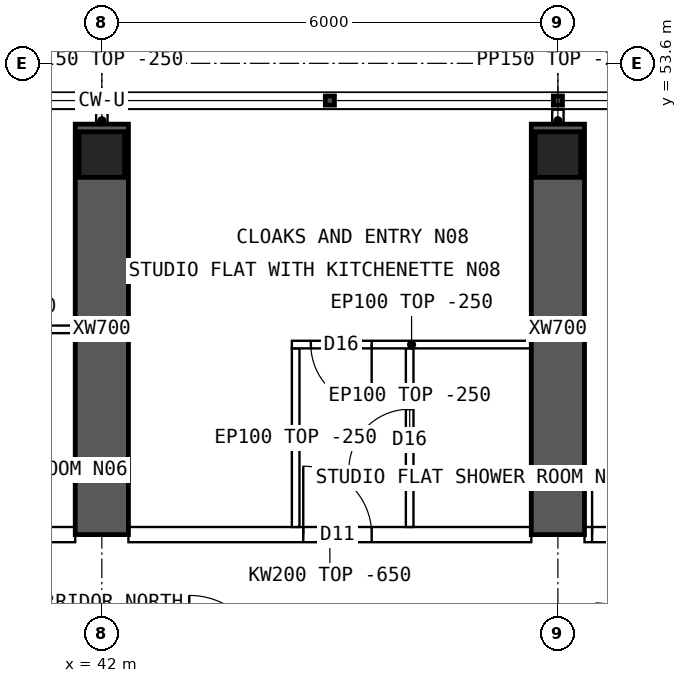
"""IFC4 building model, lengths in metres.
Left out: names, types, materials, properties, quantities, classifications, styles, units other than length and angle.
Written with IfcOpenShell. Run it as: python <this file> out.ifc"""

import sys

from ifc_helpers import new_model, si_unit, direction, frame, frame_2d, origin, origin_2d, place, context, subcontext, project, spatial, polyline, rectangle, hollow_rectangle, outline, extrude, element, fill, save


model = new_model("IFC4")
c1 = context("Model", 3, precision=1e-05, world=origin(), true_north=direction((0.0, 1.0)))
c2 = subcontext(c1, "Body", "Model", "MODEL_VIEW")
j1 = project(units=[si_unit("LENGTHUNIT", "METRE"), si_unit("PLANEANGLEUNIT", "RADIAN")], contexts=[c1])
p1 = place(None, origin())
s1 = spatial("IfcSite", under=j1, at=p1, CompositionType="ELEMENT")
p2 = place(p1, origin())
s2 = spatial("IfcBuilding", under=s1, at=p2, CompositionType="ELEMENT")
p3 = place(p2, frame((0.0, 0.0, 216.55)))
s3 = spatial("IfcBuildingStorey", under=s2, at=p3, CompositionType="ELEMENT", Elevation=216.55)
for number, where, z_axis, x_axis in (
    (1, (42.0, 52.4, 0.0), (0.0, 0.0, 1.0), (1.0, 0.0, 0.0)),
    (2, (48.0, 52.4, 0.0), (0.0, 0.0, 1.0), (1.0, 0.0, 0.0)),
):
    element("IfcColumn", number, at=place(p3, frame(where, z_axis=z_axis, x_axis=x_axis)), inside=s3, PredefinedType="COLUMN", context=c2, shape_type="SweptSolid", body=[
        extrude(hollow_rectangle(XDim=0.6, YDim=0.6, WallThickness=0.06, at=origin_2d()), origin(), (0.0, 0.0, 1.0), 3.75),
    ])
for number, where, z_axis, x_axis in (
    (3, (42.0, 47.4, 0.0), (0.0, 0.0, 1.0), (0.0, 1.0, 0.0)),
    (4, (48.0, 47.4, 0.0), (0.0, 0.0, 1.0), (0.0, 1.0, 0.0)),
):
    element("IfcWall", number, at=place(p3, frame(where, z_axis=z_axis, x_axis=x_axis)), inside=s3, PredefinedType="SHEAR", context=c2, shape_type="SweptSolid", body=[
        extrude(rectangle(XDim=5.4, YDim=0.7, at=frame_2d((2.7, 0.0))), origin(), (0.0, 0.0, 1.0), 3.75),
    ])
p4 = place(p3, frame((36.35, 47.4, 0.0), z_axis=(0.0, 0.0, 1.0), x_axis=(1.0, 0.0, 0.0)))
e5 = element("IfcWall", 5, at=p4, inside=s3, PredefinedType="SOLIDWALL", context=c2, shape_type="SweptSolid", body=[
    extrude(outline(polyline([(0.0, 0.0), (5.3, 0.0), (5.3, 3.1), (0.0, 3.1), (0.0, 0.0)])), frame((0.0, 0.1, 0.0), z_axis=(0.0, -1.0, 0.0), x_axis=(1.0, 0.0, 0.0)), (0.0, 0.0, 1.0), 0.2),
])
p5 = place(p4, frame((0.3, 0.0, 0.0)))
e6 = element("IfcOpeningElement", 6, at=p5, cuts=e5, PredefinedType="OPENING", context=c2, shape_type="SweptSolid", body=[
    extrude(rectangle(XDim=1.0, YDim=2.1, at=frame_2d((0.5, 1.05))), frame((0.0, 0.11, 0.0), z_axis=(0.0, -1.0, 0.0), x_axis=(1.0, 0.0, 0.0)), (0.0, 0.0, 1.0), 0.22),
])
p6 = place(p3, frame((42.35, 47.4, 0.0), z_axis=(0.0, 0.0, 1.0), x_axis=(1.0, 0.0, 0.0)))
e7 = element("IfcWall", 7, at=p6, inside=s3, PredefinedType="SOLIDWALL", context=c2, shape_type="SweptSolid", body=[
    extrude(outline(polyline([(0.0, 0.0), (5.3, 0.0), (5.3, 3.1), (0.0, 3.1), (0.0, 0.0)])), frame((0.0, 0.1, 0.0), z_axis=(0.0, -1.0, 0.0), x_axis=(1.0, 0.0, 0.0)), (0.0, 0.0, 1.0), 0.2),
])
p7 = place(p6, frame((2.3, 0.0, 0.0)))
e8 = element("IfcOpeningElement", 8, at=p7, cuts=e7, PredefinedType="OPENING", context=c2, shape_type="SweptSolid", body=[
    extrude(rectangle(XDim=0.9, YDim=2.1, at=frame_2d((0.45, 1.05))), frame((0.0, 0.11, 0.0), z_axis=(0.0, -1.0, 0.0), x_axis=(1.0, 0.0, 0.0)), (0.0, 0.0, 1.0), 0.22),
])
p8 = place(p3, frame((48.35, 47.4, 0.0), z_axis=(0.0, 0.0, 1.0), x_axis=(1.0, 0.0, 0.0)))
e9 = element("IfcWall", 9, at=p8, inside=s3, PredefinedType="SOLIDWALL", context=c2, shape_type="SweptSolid", body=[
    extrude(outline(polyline([(0.0, 0.0), (5.3, 0.0), (5.3, 3.1), (0.0, 3.1), (0.0, 0.0)])), frame((0.0, 0.1, 0.0), z_axis=(0.0, -1.0, 0.0), x_axis=(1.0, 0.0, 0.0)), (0.0, 0.0, 1.0), 0.2),
])
p9 = place(p8, frame((0.1, 0.0, 0.0)))
e10 = element("IfcOpeningElement", 10, at=p9, cuts=e9, PredefinedType="OPENING", context=c2, shape_type="SweptSolid", body=[
    extrude(rectangle(XDim=0.9, YDim=2.1, at=frame_2d((0.45, 1.05))), frame((0.0, 0.11, 0.0), z_axis=(0.0, -1.0, 0.0), x_axis=(1.0, 0.0, 0.0)), (0.0, 0.0, 1.0), 0.22),
])
p10 = place(p3, frame((39.0, 50.1, 0.0), z_axis=(0.0, 0.0, 1.0), x_axis=(1.0, 0.0, 0.0)))
e11 = element("IfcWall", 11, at=p10, inside=s3, PredefinedType="PARTITIONING", context=c2, shape_type="SweptSolid", body=[
    extrude(rectangle(XDim=2.65, YDim=0.1, at=frame_2d((1.325, 0.0))), origin(), (0.0, 0.0, 1.0), 3.5),
])
p11 = place(p3, frame((44.5, 49.9, 0.0), z_axis=(0.0, 0.0, 1.0), x_axis=(1.0, 0.0, 0.0)))
e12 = element("IfcWall", 12, at=p11, inside=s3, PredefinedType="PARTITIONING", context=c2, shape_type="SweptSolid", body=[
    extrude(rectangle(XDim=3.15, YDim=0.1, at=frame_2d((1.575, 0.0))), origin(), (0.0, 0.0, 1.0), 3.5),
])
p12 = place(p11, frame((0.25, 0.0, 0.0)))
e13 = element("IfcOpeningElement", 13, at=p12, cuts=e12, PredefinedType="OPENING", context=c2, shape_type="SweptSolid", body=[
    extrude(rectangle(XDim=0.8, YDim=2.1, at=frame_2d((0.4, 1.05))), frame((0.0, 0.06, 0.0), z_axis=(0.0, -1.0, 0.0), x_axis=(1.0, 0.0, 0.0)), (0.0, 0.0, 1.0), 0.12),
])
p13 = place(p3, frame((44.55, 49.85, 0.0), z_axis=(0.0, 0.0, 1.0), x_axis=(0.0, -1.0, 0.0)))
e14 = element("IfcWall", 14, at=p13, inside=s3, PredefinedType="PARTITIONING", context=c2, shape_type="SweptSolid", body=[
    extrude(outline(polyline([(0.0, 0.0), (2.35, 0.0), (2.35, 3.1), (2.302, 3.1), (2.3, 3.5), (0.0, 3.5), (0.0, 0.0)])), frame((0.0, 0.05, 0.0), z_axis=(0.0, -1.0, 0.0), x_axis=(1.0, 0.0, 0.0)), (0.0, 0.0, 1.0), 0.1),
])
p14 = place(p3, frame((46.05, 49.85, 0.0), z_axis=(0.0, 0.0, 1.0), x_axis=(0.0, -1.0, 0.0)))
e15 = element("IfcWall", 15, at=p14, inside=s3, PredefinedType="PARTITIONING", context=c2, shape_type="SweptSolid", body=[
    extrude(outline(polyline([(0.0, 0.0), (2.35, 0.0), (2.35, 3.1), (2.302, 3.1), (2.3, 3.5), (0.0, 3.5), (0.0, 0.0)])), frame((0.0, 0.05, 0.0), z_axis=(0.0, -1.0, 0.0), x_axis=(1.0, 0.0, 0.0)), (0.0, 0.0, 1.0), 0.1),
])
p15 = place(p14, frame((0.8, 0.0, 0.0)))
e16 = element("IfcOpeningElement", 16, at=p15, cuts=e15, PredefinedType="OPENING", context=c2, shape_type="SweptSolid", body=[
    extrude(rectangle(XDim=0.8, YDim=2.1, at=frame_2d((0.4, 1.05))), frame((0.0, 0.06, 0.0), z_axis=(0.0, -1.0, 0.0), x_axis=(1.0, 0.0, 0.0)), (0.0, 0.0, 1.0), 0.12),
])
for number, where, z_axis, x_axis in (
    (17, (42.0, 52.7, 0.0), (0.0, 0.0, 1.0), (0.0, 1.0, 0.0)),
    (18, (48.0, 52.7, 0.0), (0.0, 0.0, 1.0), (0.0, 1.0, 0.0)),
):
    element("IfcWall", number, at=place(p3, frame(where, z_axis=z_axis, x_axis=x_axis)), inside=s3, PredefinedType="PARTITIONING", context=c2, shape_type="SweptSolid", body=[
        extrude(rectangle(XDim=0.29, YDim=0.15, at=frame_2d((0.145, 0.0))), origin(), (0.0, 0.0, 1.0), 3.5),
    ])
p16 = place(p12, origin())
e19 = element("IfcDoor", 19, at=p16, inside=s3, OperationType="SINGLE_SWING_RIGHT", PredefinedType="DOOR", context=c2, shape_type="SweptSolid", body=[
    extrude(rectangle(XDim=0.8, YDim=2.1, at=frame_2d((0.4, 1.05))), frame((0.0, 0.025, 0.0), z_axis=(0.0, -1.0, 0.0), x_axis=(1.0, 0.0, 0.0)), (0.0, 0.0, 1.0), 0.05),
])
fill(e13, e19)
p17 = place(p15, origin())
e20 = element("IfcDoor", 20, at=p17, inside=s3, OperationType="SINGLE_SWING_RIGHT", PredefinedType="DOOR", context=c2, shape_type="SweptSolid", body=[
    extrude(rectangle(XDim=0.8, YDim=2.1, at=frame_2d((0.4, 1.05))), frame((0.0, 0.025, 0.0), z_axis=(0.0, -1.0, 0.0), x_axis=(1.0, 0.0, 0.0)), (0.0, 0.0, 1.0), 0.05),
])
fill(e16, e20)
p18 = place(p7, origin())
e21 = element("IfcDoor", 21, at=p18, inside=s3, OperationType="SINGLE_SWING_LEFT", PredefinedType="DOOR", context=c2, shape_type="SweptSolid", body=[
    extrude(rectangle(XDim=0.9, YDim=2.1, at=frame_2d((0.45, 1.05))), frame((0.0, 0.025, 0.0), z_axis=(0.0, -1.0, 0.0), x_axis=(1.0, 0.0, 0.0)), (0.0, 0.0, 1.0), 0.05),
])
fill(e8, e21)
p19 = place(p9, origin())
e22 = element("IfcDoor", 22, at=p19, inside=s3, OperationType="SINGLE_SWING_LEFT", PredefinedType="DOOR", context=c2, shape_type="SweptSolid", body=[
    extrude(rectangle(XDim=0.9, YDim=2.1, at=frame_2d((0.45, 1.05))), frame((0.0, 0.025, 0.0), z_axis=(0.0, -1.0, 0.0), x_axis=(1.0, 0.0, 0.0)), (0.0, 0.0, 1.0), 0.05),
])
fill(e10, e22)
save(model, sys.argv[1])
